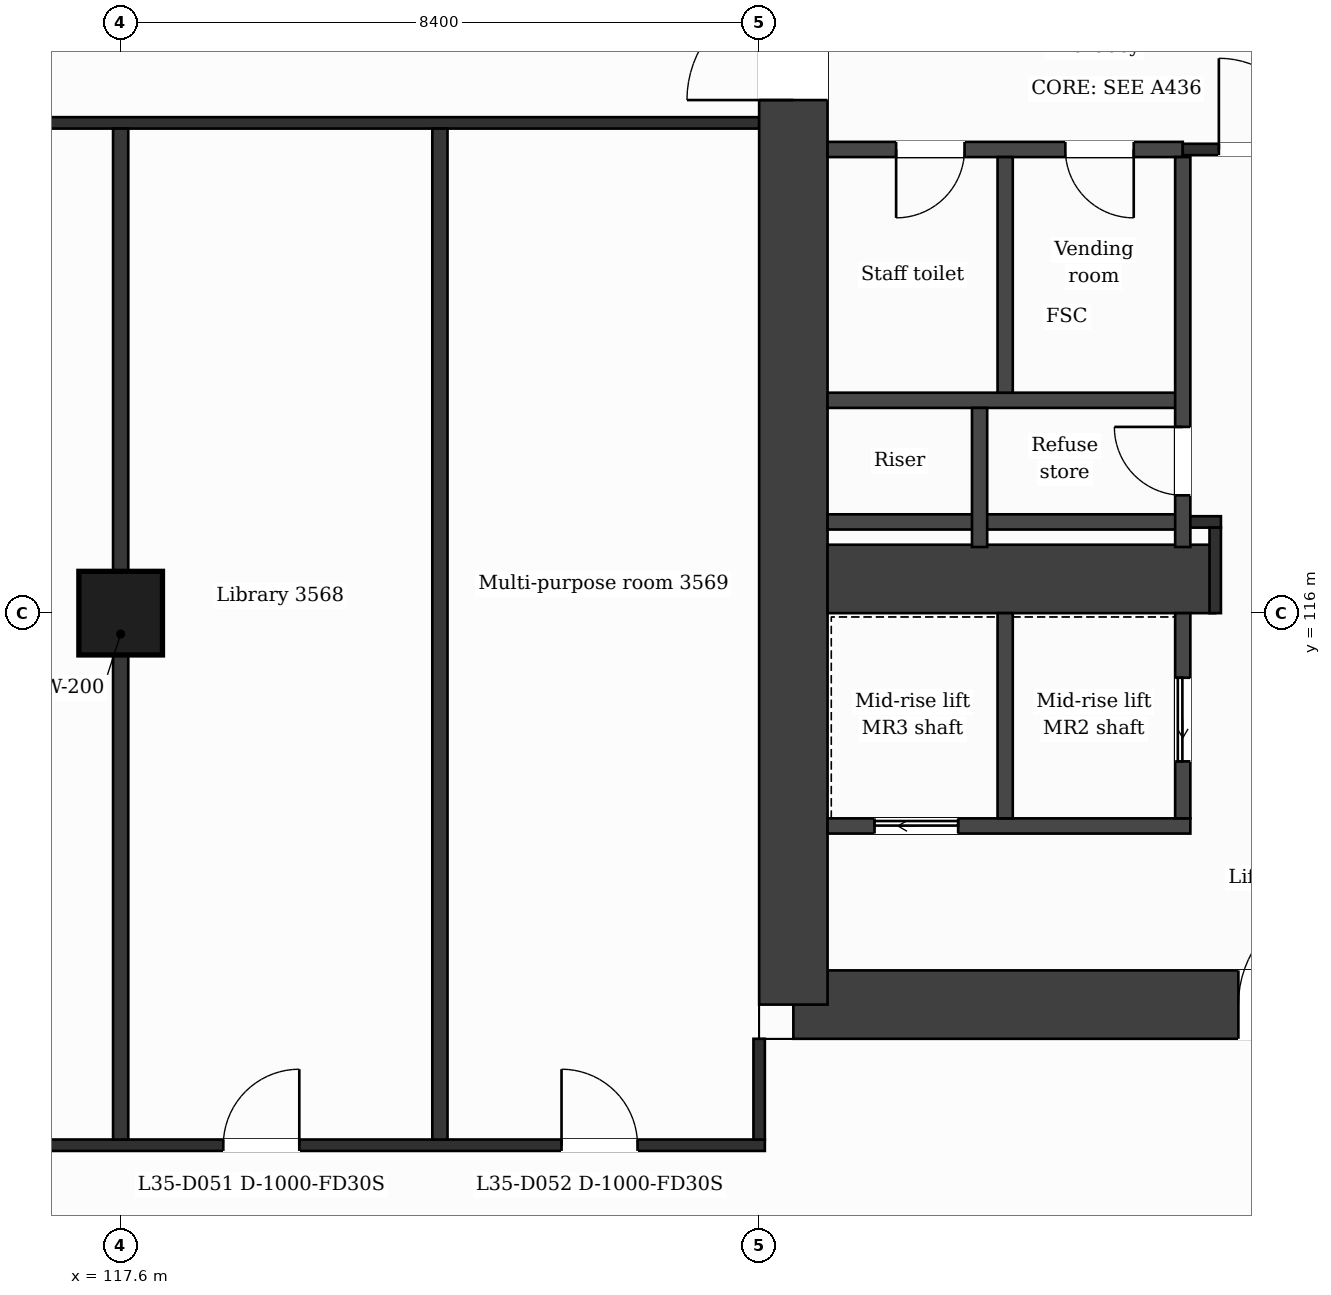
"""IFC4 building model, lengths in metres.
Left out: names, types, materials, properties, quantities, classifications, styles, units other than length and angle.
Written with IfcOpenShell. Run it as: python <this file> out.ifc"""

import sys

from ifc_helpers import new_model, si_unit, direction, frame, frame_2d, origin, origin_2d, place, context, subcontext, project, spatial, rectangle, extrude, element, fill, save


model = new_model("IFC4")
c1 = context("Model", 3, precision=1e-05, world=origin(), true_north=direction((0.0, 1.0)))
c2 = subcontext(c1, "Body", "Model", "MODEL_VIEW")
j1 = project(units=[si_unit("LENGTHUNIT", "METRE"), si_unit("PLANEANGLEUNIT", "RADIAN")], contexts=[c1])
p1 = place(None, origin())
s1 = spatial("IfcSite", under=j1, at=p1, CompositionType="ELEMENT")
p2 = place(p1, origin())
s2 = spatial("IfcBuilding", under=s1, at=p2, CompositionType="ELEMENT")
p3 = place(p2, frame((0.0, 0.0, 151.5)))
s3 = spatial("IfcBuildingStorey", under=s2, at=p3, CompositionType="ELEMENT", Elevation=151.5)
p4 = place(p3, frame((140.616, 110.85, 0.0), z_axis=(0.0, 0.0, 1.0), x_axis=(-1.0, 0.0, 0.0)))
e1 = element("IfcWall", 1, at=p4, inside=s3, PredefinedType="SHEAR", context=c2, shape_type="SweptSolid", body=[
    extrude(rectangle(XDim=14.166, YDim=0.9, at=frame_2d((7.083, 0.0))), origin(), (0.0, 0.0, 1.0), 3.7),
])
p5 = place(p4, frame((6.911, 0.0, 0.0)))
e2 = element("IfcOpeningElement", 2, at=p5, cuts=e1, PredefinedType="OPENING", context=c2, shape_type="SweptSolid", body=[
    extrude(rectangle(XDim=1.4, YDim=2.1, at=frame_2d((0.7, 1.05))), frame((0.0, 0.46, 0.0), z_axis=(0.0, -1.0, 0.0), x_axis=(1.0, 0.0, 0.0)), (0.0, 0.0, 1.0), 0.92),
])
p6 = place(p3, frame((126.45, 110.85, 0.0), z_axis=(0.0, 0.0, 1.0), x_axis=(0.0, 1.0, 0.0)))
e3 = element("IfcWall", 3, at=p6, inside=s3, PredefinedType="SHEAR", context=c2, shape_type="SweptSolid", body=[
    extrude(rectangle(XDim=21.1, YDim=0.9, at=frame_2d((10.55, 0.0))), origin(), (0.0, 0.0, 1.0), 3.7),
])
p7 = place(p6, frame((11.9, 0.0, 0.0)))
e4 = element("IfcOpeningElement", 4, at=p7, cuts=e3, PredefinedType="OPENING", context=c2, shape_type="SweptSolid", body=[
    extrude(rectangle(XDim=1.4, YDim=2.1, at=frame_2d((0.7, 1.05))), frame((0.0, 0.46, 0.0), z_axis=(0.0, -1.0, 0.0), x_axis=(1.0, 0.0, 0.0)), (0.0, 0.0, 1.0), 0.92),
])
p8 = place(p3, frame((126.9, 116.45, 0.0), z_axis=(0.0, 0.0, 1.0), x_axis=(1.0, 0.0, 0.0)))
e5 = element("IfcWall", 5, at=p8, inside=s3, PredefinedType="SHEAR", context=c2, shape_type="SweptSolid", body=[
    extrude(rectangle(XDim=5.1, YDim=0.9, at=frame_2d((2.55, 0.0))), origin(), (0.0, 0.0, 1.0), 3.7),
])
p9 = place(p3, frame((117.6, 116.0, 0.0), z_axis=(0.0, 0.0, 1.0), x_axis=(1.0, 0.0, 0.0)))
e6 = element("IfcColumn", 6, at=p9, inside=s3, PredefinedType="COLUMN", context=c2, shape_type="SweptSolid", body=[
    extrude(rectangle(XDim=1.1, YDim=1.1, at=origin_2d()), origin(), (0.0, 0.0, 1.0), 3.7),
])
p10 = place(p3, frame((100.725, 109.0, 0.0), z_axis=(0.0, 0.0, 1.0), x_axis=(1.0, 0.0, 0.0)))
e7 = element("IfcWall", 7, at=p10, inside=s3, PredefinedType="PARTITIONING", context=c2, shape_type="SweptSolid", body=[
    extrude(rectangle(XDim=25.35, YDim=0.15, at=frame_2d((12.675, 0.0))), origin(), (0.0, 0.0, 1.0), 3.38),
])
p11 = place(p10, frame((2.1, 0.0, 0.0)))
e8 = element("IfcOpeningElement", 8, at=p11, cuts=e7, PredefinedType="OPENING", context=c2, shape_type="SweptSolid", body=[
    extrude(rectangle(XDim=1.0, YDim=2.1, at=frame_2d((0.5, 1.05))), frame((0.0, 0.085, 0.0), z_axis=(0.0, -1.0, 0.0), x_axis=(1.0, 0.0, 0.0)), (0.0, 0.0, 1.0), 0.17),
])
p12 = place(p10, frame((12.845, 0.0, 0.0)))
e9 = element("IfcOpeningElement", 9, at=p12, cuts=e7, PredefinedType="OPENING", context=c2, shape_type="SweptSolid", body=[
    extrude(rectangle(XDim=1.0, YDim=2.1, at=frame_2d((0.5, 1.05))), frame((0.0, 0.085, 0.0), z_axis=(0.0, -1.0, 0.0), x_axis=(1.0, 0.0, 0.0)), (0.0, 0.0, 1.0), 0.17),
])
p13 = place(p10, frame((18.225, 0.0, 0.0)))
e10 = element("IfcOpeningElement", 10, at=p13, cuts=e7, PredefinedType="OPENING", context=c2, shape_type="SweptSolid", body=[
    extrude(rectangle(XDim=1.0, YDim=2.1, at=frame_2d((0.5, 1.05))), frame((0.0, 0.085, 0.0), z_axis=(0.0, -1.0, 0.0), x_axis=(1.0, 0.0, 0.0)), (0.0, 0.0, 1.0), 0.17),
])
p14 = place(p10, frame((22.675, 0.0, 0.0)))
e11 = element("IfcOpeningElement", 11, at=p14, cuts=e7, PredefinedType="OPENING", context=c2, shape_type="SweptSolid", body=[
    extrude(rectangle(XDim=1.0, YDim=2.1, at=frame_2d((0.5, 1.05))), frame((0.0, 0.085, 0.0), z_axis=(0.0, -1.0, 0.0), x_axis=(1.0, 0.0, 0.0)), (0.0, 0.0, 1.0), 0.17),
])
p15 = place(p3, frame((126.9, 113.2, 0.0), z_axis=(0.0, 0.0, 1.0), x_axis=(1.0, 0.0, 0.0)))
e12 = element("IfcWall", 12, at=p15, inside=s3, PredefinedType="PARTITIONING", context=c2, shape_type="SweptSolid", body=[
    extrude(rectangle(XDim=4.773, YDim=0.2, at=frame_2d((2.387, 0.0))), origin(), (0.0, 0.0, 1.0), 3.38),
])
p16 = place(p15, frame((0.618, 0.0, 0.0)))
e13 = element("IfcOpeningElement", 13, at=p16, cuts=e12, PredefinedType="OPENING", context=c2, shape_type="SweptSolid", body=[
    extrude(rectangle(XDim=1.1, YDim=2.1, at=frame_2d((0.55, 1.05))), frame((0.0, 0.11, 0.0), z_axis=(0.0, -1.0, 0.0), x_axis=(1.0, 0.0, 0.0)), (0.0, 0.0, 1.0), 0.22),
])
p17 = place(p3, frame((126.9, 117.2, 0.0), z_axis=(0.0, 0.0, 1.0), x_axis=(1.0, 0.0, 0.0)))
e14 = element("IfcWall", 14, at=p17, inside=s3, PredefinedType="PARTITIONING", context=c2, shape_type="SweptSolid", body=[
    extrude(rectangle(XDim=4.673, YDim=0.2, at=frame_2d((2.336, 0.0))), origin(), (0.0, 0.0, 1.0), 3.38),
])
p18 = place(p3, frame((131.573, 117.2, 0.0), z_axis=(0.0, 0.0, 1.0), x_axis=(1.0, 0.0, 0.0)))
e15 = element("IfcWall", 15, at=p18, inside=s3, PredefinedType="PARTITIONING", context=c2, shape_type="SweptSolid", body=[
    extrude(rectangle(XDim=0.502, YDim=0.15, at=frame_2d((0.251, 0.0))), origin(), (0.0, 0.0, 1.0), 3.38),
])
p19 = place(p3, frame((126.9, 118.8, 0.0), z_axis=(0.0, 0.0, 1.0), x_axis=(1.0, 0.0, 0.0)))
e16 = element("IfcWall", 16, at=p19, inside=s3, PredefinedType="PARTITIONING", context=c2, shape_type="SweptSolid", body=[
    extrude(rectangle(XDim=4.673, YDim=0.2, at=frame_2d((2.336, 0.0))), origin(), (0.0, 0.0, 1.0), 3.38),
])
p20 = place(p3, frame((126.9, 122.1, 0.0), z_axis=(0.0, 0.0, 1.0), x_axis=(1.0, 0.0, 0.0)))
e17 = element("IfcWall", 17, at=p20, inside=s3, PredefinedType="PARTITIONING", context=c2, shape_type="SweptSolid", body=[
    extrude(rectangle(XDim=4.673, YDim=0.2, at=frame_2d((2.336, 0.0))), origin(), (0.0, 0.0, 1.0), 3.38),
])
p21 = place(p20, frame((3.128, 0.0, 0.0)))
e18 = element("IfcOpeningElement", 18, at=p21, cuts=e17, PredefinedType="OPENING", context=c2, shape_type="SweptSolid", body=[
    extrude(rectangle(XDim=0.9, YDim=2.1, at=frame_2d((0.45, 1.05))), frame((0.0, 0.11, 0.0), z_axis=(0.0, -1.0, 0.0), x_axis=(1.0, 0.0, 0.0)), (0.0, 0.0, 1.0), 0.22),
])
p22 = place(p20, frame((0.902, 0.0, 0.0)))
e19 = element("IfcOpeningElement", 19, at=p22, cuts=e17, PredefinedType="OPENING", context=c2, shape_type="SweptSolid", body=[
    extrude(rectangle(XDim=0.9, YDim=2.1, at=frame_2d((0.45, 1.05))), frame((0.0, 0.11, 0.0), z_axis=(0.0, -1.0, 0.0), x_axis=(1.0, 0.0, 0.0)), (0.0, 0.0, 1.0), 0.22),
])
p23 = place(p3, frame((131.573, 122.1, 0.0), z_axis=(0.0, 0.0, 1.0), x_axis=(1.0, 0.0, 0.0)))
e20 = element("IfcWall", 20, at=p23, inside=s3, PredefinedType="PARTITIONING", context=c2, shape_type="SweptSolid", body=[
    extrude(rectangle(XDim=2.4, YDim=0.15, at=frame_2d((1.2, 0.0))), origin(), (0.0, 0.0, 1.0), 3.38),
])
p24 = place(p23, frame((0.475, 0.0, 0.0)))
e21 = element("IfcOpeningElement", 21, at=p24, cuts=e20, PredefinedType="OPENING", context=c2, shape_type="SweptSolid", body=[
    extrude(rectangle(XDim=1.2, YDim=2.1, at=frame_2d((0.6, 1.05))), frame((0.0, 0.085, 0.0), z_axis=(0.0, -1.0, 0.0), x_axis=(1.0, 0.0, 0.0)), (0.0, 0.0, 1.0), 0.17),
])
p25 = place(p3, frame((100.8, 122.45, 0.0), z_axis=(0.0, 0.0, 1.0), x_axis=(1.0, 0.0, 0.0)))
e22 = element("IfcWall", 22, at=p25, inside=s3, PredefinedType="PARTITIONING", context=c2, shape_type="SweptSolid", body=[
    extrude(rectangle(XDim=25.2, YDim=0.15, at=frame_2d((12.6, 0.0))), origin(), (0.0, 0.0, 1.0), 3.38),
])
for number, where, z_axis, x_axis in (
    (23, (117.6, 109.075, 0.0), (0.0, 0.0, 1.0), (0.0, 1.0, 0.0)),
    (24, (121.8, 109.075, 0.0), (0.0, 0.0, 1.0), (0.0, 1.0, 0.0)),
):
    element("IfcWall", number, at=place(p3, frame(where, z_axis=z_axis, x_axis=x_axis)), inside=s3, PredefinedType="PARTITIONING", context=c2, shape_type="SweptSolid", body=[
        extrude(rectangle(XDim=13.3, YDim=0.2, at=frame_2d((6.65, 0.0))), origin(), (0.0, 0.0, 1.0), 3.38),
    ])
p26 = place(p3, frame((126.0, 109.075, 0.0), z_axis=(0.0, 0.0, 1.0), x_axis=(0.0, 1.0, 0.0)))
e25 = element("IfcWall", 25, at=p26, inside=s3, PredefinedType="PARTITIONING", context=c2, shape_type="SweptSolid", body=[
    extrude(rectangle(XDim=1.325, YDim=0.15, at=frame_2d((0.663, 0.0))), origin(), (0.0, 0.0, 1.0), 3.38),
])
p27 = place(p3, frame((128.9, 116.87, 0.0), z_axis=(0.0, 0.0, 1.0), x_axis=(0.0, 1.0, 0.0)))
e26 = element("IfcWall", 26, at=p27, inside=s3, PredefinedType="PARTITIONING", context=c2, shape_type="SweptSolid", body=[
    extrude(rectangle(XDim=1.83, YDim=0.2, at=frame_2d((0.915, 0.0))), origin(), (0.0, 0.0, 1.0), 3.38),
])
p28 = place(p3, frame((129.237, 113.3, 0.0), z_axis=(0.0, 0.0, 1.0), x_axis=(0.0, 1.0, 0.0)))
e27 = element("IfcWall", 27, at=p28, inside=s3, PredefinedType="PARTITIONING", context=c2, shape_type="SweptSolid", body=[
    extrude(rectangle(XDim=2.7, YDim=0.2, at=frame_2d((1.35, 0.0))), origin(), (0.0, 0.0, 1.0), 3.38),
])
p29 = place(p3, frame((129.237, 118.9, 0.0), z_axis=(0.0, 0.0, 1.0), x_axis=(0.0, 1.0, 0.0)))
e28 = element("IfcWall", 28, at=p29, inside=s3, PredefinedType="PARTITIONING", context=c2, shape_type="SweptSolid", body=[
    extrude(rectangle(XDim=3.1, YDim=0.2, at=frame_2d((1.55, 0.0))), origin(), (0.0, 0.0, 1.0), 3.38),
])
p30 = place(p3, frame((131.573, 113.3, 0.0), z_axis=(0.0, 0.0, 1.0), x_axis=(0.0, 1.0, 0.0)))
e29 = element("IfcWall", 29, at=p30, inside=s3, PredefinedType="PARTITIONING", context=c2, shape_type="SweptSolid", body=[
    extrude(rectangle(XDim=2.7, YDim=0.2, at=frame_2d((1.35, 0.0))), origin(), (0.0, 0.0, 1.0), 3.38),
])
p31 = place(p30, frame((0.75, 0.0, 0.0)))
e30 = element("IfcOpeningElement", 30, at=p31, cuts=e29, PredefinedType="OPENING", context=c2, shape_type="SweptSolid", body=[
    extrude(rectangle(XDim=1.1, YDim=2.1, at=frame_2d((0.55, 1.05))), frame((0.0, 0.11, 0.0), z_axis=(0.0, -1.0, 0.0), x_axis=(1.0, 0.0, 0.0)), (0.0, 0.0, 1.0), 0.22),
])
p32 = place(p3, frame((131.573, 116.87, 0.0), z_axis=(0.0, 0.0, 1.0), x_axis=(0.0, 1.0, 0.0)))
e31 = element("IfcWall", 31, at=p32, inside=s3, PredefinedType="PARTITIONING", context=c2, shape_type="SweptSolid", body=[
    extrude(rectangle(XDim=5.13, YDim=0.2, at=frame_2d((2.565, 0.0))), origin(), (0.0, 0.0, 1.0), 3.38),
])
p33 = place(p32, frame((0.68, 0.0, 0.0)))
e32 = element("IfcOpeningElement", 32, at=p33, cuts=e31, PredefinedType="OPENING", context=c2, shape_type="SweptSolid", body=[
    extrude(rectangle(XDim=0.9, YDim=2.1, at=frame_2d((0.45, 1.05))), frame((0.0, 0.11, 0.0), z_axis=(0.0, -1.0, 0.0), x_axis=(1.0, 0.0, 0.0)), (0.0, 0.0, 1.0), 0.22),
])
p34 = place(p3, frame((132.0, 116.0, 0.0), z_axis=(0.0, 0.0, 1.0), x_axis=(0.0, 1.0, 0.0)))
e33 = element("IfcWall", 33, at=p34, inside=s3, PredefinedType="PARTITIONING", context=c2, shape_type="SweptSolid", body=[
    extrude(rectangle(XDim=1.125, YDim=0.15, at=frame_2d((0.562, 0.0))), origin(), (0.0, 0.0, 1.0), 3.38),
])
p35 = place(p24, origin())
e34 = element("IfcDoor", 34, at=p35, inside=s3, OperationType="SINGLE_SWING_LEFT", PredefinedType="DOOR", context=c2, shape_type="SweptSolid", body=[
    extrude(rectangle(XDim=1.2, YDim=2.1, at=frame_2d((0.6, 1.05))), frame((0.0, 0.025, 0.0), z_axis=(0.0, -1.0, 0.0), x_axis=(1.0, 0.0, 0.0)), (0.0, 0.0, 1.0), 0.05),
])
fill(e21, e34)
p36 = place(p21, origin())
e35 = element("IfcDoor", 35, at=p36, inside=s3, OperationType="SINGLE_SWING_RIGHT", PredefinedType="DOOR", context=c2, shape_type="SweptSolid", body=[
    extrude(rectangle(XDim=0.9, YDim=2.1, at=frame_2d((0.45, 1.05))), frame((0.0, 0.025, 0.0), z_axis=(0.0, -1.0, 0.0), x_axis=(1.0, 0.0, 0.0)), (0.0, 0.0, 1.0), 0.05),
])
fill(e18, e35)
p37 = place(p22, origin())
e36 = element("IfcDoor", 36, at=p37, inside=s3, OperationType="SINGLE_SWING_LEFT", PredefinedType="DOOR", context=c2, shape_type="SweptSolid", body=[
    extrude(rectangle(XDim=0.9, YDim=2.1, at=frame_2d((0.45, 1.05))), frame((0.0, 0.025, 0.0), z_axis=(0.0, -1.0, 0.0), x_axis=(1.0, 0.0, 0.0)), (0.0, 0.0, 1.0), 0.05),
])
fill(e19, e36)
p38 = place(p33, origin())
e37 = element("IfcDoor", 37, at=p38, inside=s3, OperationType="SINGLE_SWING_RIGHT", PredefinedType="DOOR", context=c2, shape_type="SweptSolid", body=[
    extrude(rectangle(XDim=0.9, YDim=2.1, at=frame_2d((0.45, 1.05))), frame((0.0, 0.025, 0.0), z_axis=(0.0, -1.0, 0.0), x_axis=(1.0, 0.0, 0.0)), (0.0, 0.0, 1.0), 0.05),
])
fill(e32, e37)
p39 = place(p31, origin())
e38 = element("IfcDoor", 38, at=p39, inside=s3, OperationType="SLIDING_TO_LEFT", PredefinedType="DOOR", context=c2, shape_type="SweptSolid", body=[
    extrude(rectangle(XDim=1.1, YDim=2.1, at=frame_2d((0.55, 1.05))), frame((0.0, 0.025, 0.0), z_axis=(0.0, -1.0, 0.0), x_axis=(1.0, 0.0, 0.0)), (0.0, 0.0, 1.0), 0.05),
])
fill(e30, e38)
p40 = place(p16, origin())
e39 = element("IfcDoor", 39, at=p40, inside=s3, OperationType="SLIDING_TO_LEFT", PredefinedType="DOOR", context=c2, shape_type="SweptSolid", body=[
    extrude(rectangle(XDim=1.1, YDim=2.1, at=frame_2d((0.55, 1.05))), frame((0.0, 0.025, 0.0), z_axis=(0.0, -1.0, 0.0), x_axis=(1.0, 0.0, 0.0)), (0.0, 0.0, 1.0), 0.05),
])
fill(e13, e39)
p41 = place(p13, origin())
e40 = element("IfcDoor", 40, at=p41, inside=s3, OperationType="SINGLE_SWING_RIGHT", PredefinedType="DOOR", context=c2, shape_type="SweptSolid", body=[
    extrude(rectangle(XDim=1.0, YDim=2.1, at=frame_2d((0.5, 1.05))), frame((0.0, 0.025, 0.0), z_axis=(0.0, -1.0, 0.0), x_axis=(1.0, 0.0, 0.0)), (0.0, 0.0, 1.0), 0.05),
])
fill(e10, e40)
p42 = place(p14, origin())
e41 = element("IfcDoor", 41, at=p42, inside=s3, OperationType="SINGLE_SWING_LEFT", PredefinedType="DOOR", context=c2, shape_type="SweptSolid", body=[
    extrude(rectangle(XDim=1.0, YDim=2.1, at=frame_2d((0.5, 1.05))), frame((0.0, 0.025, 0.0), z_axis=(0.0, -1.0, 0.0), x_axis=(1.0, 0.0, 0.0)), (0.0, 0.0, 1.0), 0.05),
])
fill(e11, e41)
p43 = place(p5, origin())
e42 = element("IfcDoor", 42, at=p43, inside=s3, OperationType="SINGLE_SWING_LEFT", PredefinedType="DOOR", context=c2, shape_type="SweptSolid", body=[
    extrude(rectangle(XDim=1.4, YDim=2.1, at=frame_2d((0.7, 1.05))), frame((0.0, 0.025, 0.0), z_axis=(0.0, -1.0, 0.0), x_axis=(1.0, 0.0, 0.0)), (0.0, 0.0, 1.0), 0.05),
])
fill(e2, e42)
p44 = place(p7, origin())
e43 = element("IfcDoor", 43, at=p44, inside=s3, OperationType="SINGLE_SWING_LEFT", PredefinedType="DOOR", context=c2, shape_type="SweptSolid", body=[
    extrude(rectangle(XDim=1.4, YDim=2.1, at=frame_2d((0.7, 1.05))), frame((0.0, 0.025, 0.0), z_axis=(0.0, -1.0, 0.0), x_axis=(1.0, 0.0, 0.0)), (0.0, 0.0, 1.0), 0.05),
])
fill(e4, e43)
save(model, sys.argv[1])
